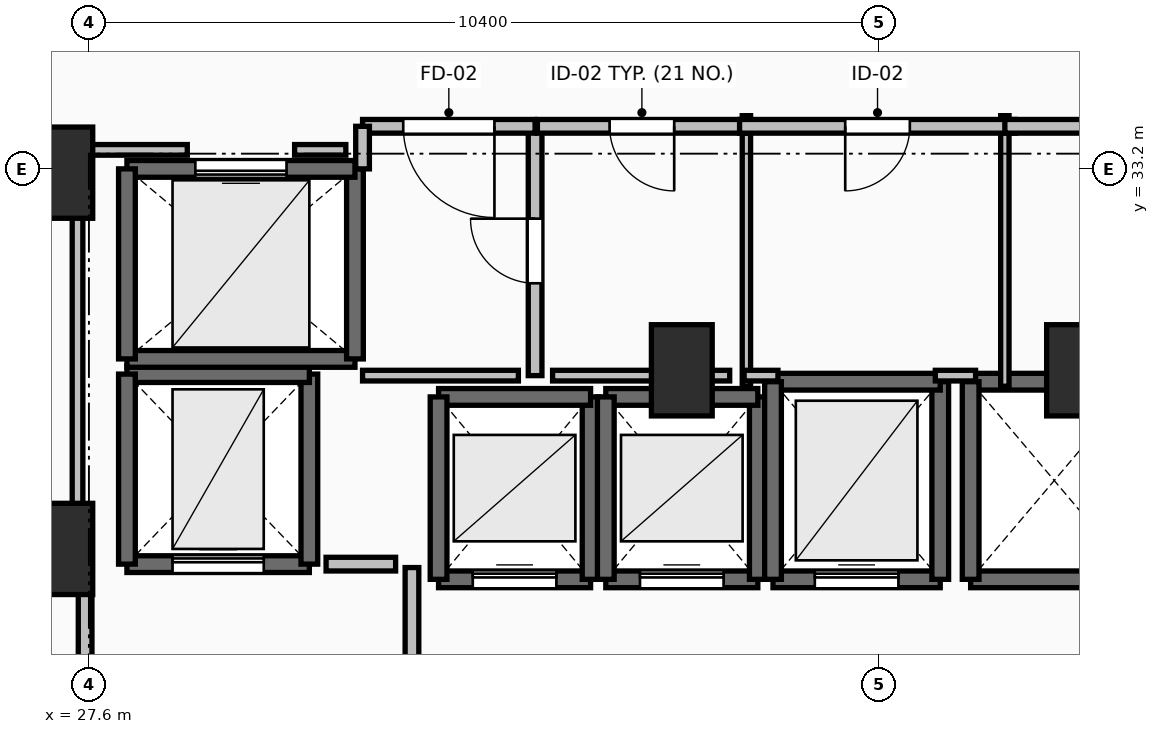
"""IFC4 building model, lengths in metres.
Left out: names, types, materials, properties, quantities, classifications, styles, units other than length and angle.
Written with IfcOpenShell. Run it as: python <this file> out.ifc"""

import sys

from ifc_helpers import new_model, si_unit, direction, frame, frame_2d, origin, origin_2d, place, context, subcontext, project, spatial, rectangle, extrude, element, fill, save


model = new_model("IFC4")
c1 = context("Model", 3, precision=1e-05, world=origin(), true_north=direction((0.0, 1.0)))
c2 = subcontext(c1, "Body", "Model", "MODEL_VIEW")
j1 = project(units=[si_unit("LENGTHUNIT", "METRE"), si_unit("PLANEANGLEUNIT", "RADIAN")], contexts=[c1])
p1 = place(None, origin())
s1 = spatial("IfcSite", under=j1, at=p1, CompositionType="ELEMENT")
p2 = place(p1, origin())
s2 = spatial("IfcBuilding", under=s1, at=p2, CompositionType="ELEMENT")
p3 = place(p2, frame((0.0, 0.0, 110.3)))
s3 = spatial("IfcBuildingStorey", under=s2, at=p3, CompositionType="ELEMENT", Elevation=110.3)
for number, where, z_axis, x_axis in (
    (1, (27.25, 28.2, 0.0), (0.0, 0.0, 1.0), (1.0, 0.0, 0.0)),
    (2, (27.25, 33.15, 0.0), (0.0, 0.0, 1.0), (1.0, 0.0, 0.0)),
    (3, (35.4, 30.55, 0.0), (0.0, 0.0, 1.0), (1.0, 0.0, 0.0)),
    (4, (40.6, 30.55, 0.0), (0.0, 0.0, 1.0), (1.0, 0.0, 0.0)),
):
    element("IfcColumn", number, at=place(p3, frame(where, z_axis=z_axis, x_axis=x_axis)), inside=s3, PredefinedType="PILASTER", context=c2, shape_type="SweptSolid", body=[
        extrude(rectangle(XDim=0.8, YDim=1.2, at=origin_2d()), origin(), (0.0, 0.0, 1.0), 3.5),
    ])
p4 = place(p3, frame((32.2, 27.8, 0.0), z_axis=(0.0, 0.0, 1.0), x_axis=(1.0, 0.0, 0.0)))
e5 = element("IfcWall", 5, at=p4, inside=s3, PredefinedType="SOLIDWALL", context=c2, shape_type="SweptSolid", body=[
    extrude(rectangle(XDim=2.0, YDim=0.22, at=frame_2d((1.0, 0.0))), origin(), (0.0, 0.0, 1.0), 3.24),
])
p5 = place(p4, frame((0.45, 0.0, 0.0)))
e6 = element("IfcOpeningElement", 6, at=p5, cuts=e5, PredefinedType="OPENING", context=c2, shape_type="SweptSolid", body=[
    extrude(rectangle(XDim=1.1, YDim=2.2, at=frame_2d((0.55, 1.1))), frame((0.0, 0.125, 0.0), z_axis=(0.0, -1.0, 0.0), x_axis=(1.0, 0.0, 0.0)), (0.0, 0.0, 1.0), 0.25),
])
p6 = place(p3, frame((34.2, 27.8, 0.0), z_axis=(0.0, 0.0, 1.0), x_axis=(0.0, 1.0, 0.0)))
e7 = element("IfcWall", 7, at=p6, inside=s3, PredefinedType="SOLIDWALL", context=c2, shape_type="SweptSolid", body=[
    extrude(rectangle(XDim=2.4, YDim=0.22, at=frame_2d((1.2, 0.0))), origin(), (0.0, 0.0, 1.0), 3.24),
])
p7 = place(p3, frame((34.2, 30.2, 0.0), z_axis=(0.0, 0.0, 1.0), x_axis=(-1.0, 0.0, 0.0)))
e8 = element("IfcWall", 8, at=p7, inside=s3, PredefinedType="SOLIDWALL", context=c2, shape_type="SweptSolid", body=[
    extrude(rectangle(XDim=2.0, YDim=0.22, at=frame_2d((1.0, 0.0))), origin(), (0.0, 0.0, 1.0), 3.24),
])
p8 = place(p3, frame((32.2, 30.2, 0.0), z_axis=(0.0, 0.0, 1.0), x_axis=(0.0, -1.0, 0.0)))
e9 = element("IfcWall", 9, at=p8, inside=s3, PredefinedType="SOLIDWALL", context=c2, shape_type="SweptSolid", body=[
    extrude(rectangle(XDim=2.4, YDim=0.22, at=frame_2d((1.2, 0.0))), origin(), (0.0, 0.0, 1.0), 3.24),
])
p9 = place(p3, frame((34.4, 27.8, 0.0), z_axis=(0.0, 0.0, 1.0), x_axis=(1.0, 0.0, 0.0)))
e10 = element("IfcWall", 10, at=p9, inside=s3, PredefinedType="SOLIDWALL", context=c2, shape_type="SweptSolid", body=[
    extrude(rectangle(XDim=2.0, YDim=0.22, at=frame_2d((1.0, 0.0))), origin(), (0.0, 0.0, 1.0), 3.24),
])
p10 = place(p9, frame((0.45, 0.0, 0.0)))
e11 = element("IfcOpeningElement", 11, at=p10, cuts=e10, PredefinedType="OPENING", context=c2, shape_type="SweptSolid", body=[
    extrude(rectangle(XDim=1.1, YDim=2.2, at=frame_2d((0.55, 1.1))), frame((0.0, 0.125, 0.0), z_axis=(0.0, -1.0, 0.0), x_axis=(1.0, 0.0, 0.0)), (0.0, 0.0, 1.0), 0.25),
])
p11 = place(p3, frame((36.4, 27.8, 0.0), z_axis=(0.0, 0.0, 1.0), x_axis=(0.0, 1.0, 0.0)))
e12 = element("IfcWall", 12, at=p11, inside=s3, PredefinedType="SOLIDWALL", context=c2, shape_type="SweptSolid", body=[
    extrude(rectangle(XDim=2.4, YDim=0.22, at=frame_2d((1.2, 0.0))), origin(), (0.0, 0.0, 1.0), 3.24),
])
p12 = place(p3, frame((36.4, 30.2, 0.0), z_axis=(0.0, 0.0, 1.0), x_axis=(-1.0, 0.0, 0.0)))
e13 = element("IfcWall", 13, at=p12, inside=s3, PredefinedType="SOLIDWALL", context=c2, shape_type="SweptSolid", body=[
    extrude(rectangle(XDim=2.0, YDim=0.22, at=frame_2d((1.0, 0.0))), origin(), (0.0, 0.0, 1.0), 3.24),
])
p13 = place(p3, frame((34.4, 30.2, 0.0), z_axis=(0.0, 0.0, 1.0), x_axis=(0.0, -1.0, 0.0)))
e14 = element("IfcWall", 14, at=p13, inside=s3, PredefinedType="SOLIDWALL", context=c2, shape_type="SweptSolid", body=[
    extrude(rectangle(XDim=2.4, YDim=0.22, at=frame_2d((1.2, 0.0))), origin(), (0.0, 0.0, 1.0), 3.24),
])
p14 = place(p3, frame((36.6, 27.8, 0.0), z_axis=(0.0, 0.0, 1.0), x_axis=(1.0, 0.0, 0.0)))
e15 = element("IfcWall", 15, at=p14, inside=s3, PredefinedType="SOLIDWALL", context=c2, shape_type="SweptSolid", body=[
    extrude(rectangle(XDim=2.2, YDim=0.22, at=frame_2d((1.1, 0.0))), origin(), (0.0, 0.0, 1.0), 3.24),
])
p15 = place(p14, frame((0.55, 0.0, 0.0)))
e16 = element("IfcOpeningElement", 16, at=p15, cuts=e15, PredefinedType="OPENING", context=c2, shape_type="SweptSolid", body=[
    extrude(rectangle(XDim=1.1, YDim=2.2, at=frame_2d((0.55, 1.1))), frame((0.0, 0.125, 0.0), z_axis=(0.0, -1.0, 0.0), x_axis=(1.0, 0.0, 0.0)), (0.0, 0.0, 1.0), 0.25),
])
p16 = place(p3, frame((38.8, 27.8, 0.0), z_axis=(0.0, 0.0, 1.0), x_axis=(0.0, 1.0, 0.0)))
e17 = element("IfcWall", 17, at=p16, inside=s3, PredefinedType="SOLIDWALL", context=c2, shape_type="SweptSolid", body=[
    extrude(rectangle(XDim=2.6, YDim=0.22, at=frame_2d((1.3, 0.0))), origin(), (0.0, 0.0, 1.0), 3.24),
])
p17 = place(p3, frame((38.8, 30.4, 0.0), z_axis=(0.0, 0.0, 1.0), x_axis=(-1.0, 0.0, 0.0)))
e18 = element("IfcWall", 18, at=p17, inside=s3, PredefinedType="SOLIDWALL", context=c2, shape_type="SweptSolid", body=[
    extrude(rectangle(XDim=2.2, YDim=0.22, at=frame_2d((1.1, 0.0))), origin(), (0.0, 0.0, 1.0), 3.24),
])
p18 = place(p3, frame((36.6, 30.4, 0.0), z_axis=(0.0, 0.0, 1.0), x_axis=(0.0, -1.0, 0.0)))
e19 = element("IfcWall", 19, at=p18, inside=s3, PredefinedType="SOLIDWALL", context=c2, shape_type="SweptSolid", body=[
    extrude(rectangle(XDim=2.6, YDim=0.22, at=frame_2d((1.3, 0.0))), origin(), (0.0, 0.0, 1.0), 3.24),
])
for number, where, z_axis, x_axis in (
    (20, (39.2, 27.8, 0.0), (0.0, 0.0, 1.0), (1.0, 0.0, 0.0)),
    (21, (41.4, 30.4, 0.0), (0.0, 0.0, 1.0), (-1.0, 0.0, 0.0)),
):
    element("IfcWall", number, at=place(p3, frame(where, z_axis=z_axis, x_axis=x_axis)), inside=s3, PredefinedType="SOLIDWALL", context=c2, shape_type="SweptSolid", body=[
        extrude(rectangle(XDim=2.2, YDim=0.22, at=frame_2d((1.1, 0.0))), origin(), (0.0, 0.0, 1.0), 3.24),
    ])
p19 = place(p3, frame((39.2, 30.4, 0.0), z_axis=(0.0, 0.0, 1.0), x_axis=(0.0, -1.0, 0.0)))
e22 = element("IfcWall", 22, at=p19, inside=s3, PredefinedType="SOLIDWALL", context=c2, shape_type="SweptSolid", body=[
    extrude(rectangle(XDim=2.6, YDim=0.22, at=frame_2d((1.3, 0.0))), origin(), (0.0, 0.0, 1.0), 3.24),
])
p20 = place(p3, frame((28.1, 28.0, 0.0), z_axis=(0.0, 0.0, 1.0), x_axis=(1.0, 0.0, 0.0)))
e23 = element("IfcWall", 23, at=p20, inside=s3, PredefinedType="SHEAR", context=c2, shape_type="SweptSolid", body=[
    extrude(rectangle(XDim=2.4, YDim=0.22, at=frame_2d((1.2, 0.0))), origin(), (0.0, 0.0, 1.0), 3.24),
])
p21 = place(p20, frame((0.6, 0.0, 0.0)))
e24 = element("IfcOpeningElement", 24, at=p21, cuts=e23, PredefinedType="OPENING", context=c2, shape_type="SweptSolid", body=[
    extrude(rectangle(XDim=1.2, YDim=2.2, at=frame_2d((0.6, 1.1))), frame((0.0, 0.125, 0.0), z_axis=(0.0, -1.0, 0.0), x_axis=(1.0, 0.0, 0.0)), (0.0, 0.0, 1.0), 0.25),
])
p22 = place(p3, frame((30.5, 28.0, 0.0), z_axis=(0.0, 0.0, 1.0), x_axis=(0.0, 1.0, 0.0)))
e25 = element("IfcWall", 25, at=p22, inside=s3, PredefinedType="SHEAR", context=c2, shape_type="SweptSolid", body=[
    extrude(rectangle(XDim=2.5, YDim=0.22, at=frame_2d((1.25, 0.0))), origin(), (0.0, 0.0, 1.0), 3.24),
])
p23 = place(p3, frame((30.5, 30.5, 0.0), z_axis=(0.0, 0.0, 1.0), x_axis=(-1.0, 0.0, 0.0)))
e26 = element("IfcWall", 26, at=p23, inside=s3, PredefinedType="SHEAR", context=c2, shape_type="SweptSolid", body=[
    extrude(rectangle(XDim=2.4, YDim=0.22, at=frame_2d((1.2, 0.0))), origin(), (0.0, 0.0, 1.0), 3.24),
])
p24 = place(p3, frame((28.1, 30.5, 0.0), z_axis=(0.0, 0.0, 1.0), x_axis=(0.0, -1.0, 0.0)))
e27 = element("IfcWall", 27, at=p24, inside=s3, PredefinedType="SHEAR", context=c2, shape_type="SweptSolid", body=[
    extrude(rectangle(XDim=2.5, YDim=0.22, at=frame_2d((1.25, 0.0))), origin(), (0.0, 0.0, 1.0), 3.24),
])
p25 = place(p3, frame((28.1, 30.7, 0.0), z_axis=(0.0, 0.0, 1.0), x_axis=(1.0, 0.0, 0.0)))
e28 = element("IfcWall", 28, at=p25, inside=s3, PredefinedType="SOLIDWALL", context=c2, shape_type="SweptSolid", body=[
    extrude(rectangle(XDim=3.0, YDim=0.22, at=frame_2d((1.5, 0.0))), origin(), (0.0, 0.0, 1.0), 3.24),
])
p26 = place(p3, frame((31.1, 30.7, 0.0), z_axis=(0.0, 0.0, 1.0), x_axis=(0.0, 1.0, 0.0)))
e29 = element("IfcWall", 29, at=p26, inside=s3, PredefinedType="SOLIDWALL", context=c2, shape_type="SweptSolid", body=[
    extrude(rectangle(XDim=2.5, YDim=0.22, at=frame_2d((1.25, 0.0))), origin(), (0.0, 0.0, 1.0), 3.24),
])
p27 = place(p3, frame((31.1, 33.2, 0.0), z_axis=(0.0, 0.0, 1.0), x_axis=(-1.0, 0.0, 0.0)))
e30 = element("IfcWall", 30, at=p27, inside=s3, PredefinedType="SOLIDWALL", context=c2, shape_type="SweptSolid", body=[
    extrude(rectangle(XDim=3.0, YDim=0.22, at=frame_2d((1.5, 0.0))), origin(), (0.0, 0.0, 1.0), 3.24),
])
p28 = place(p27, frame((0.9, 0.0, 0.0)))
e31 = element("IfcOpeningElement", 31, at=p28, cuts=e30, PredefinedType="OPENING", context=c2, shape_type="SweptSolid", body=[
    extrude(rectangle(XDim=1.2, YDim=2.2, at=frame_2d((0.6, 1.1))), frame((0.0, 0.125, 0.0), z_axis=(0.0, -1.0, 0.0), x_axis=(1.0, 0.0, 0.0)), (0.0, 0.0, 1.0), 0.25),
])
p29 = place(p3, frame((28.1, 33.2, 0.0), z_axis=(0.0, 0.0, 1.0), x_axis=(0.0, -1.0, 0.0)))
e32 = element("IfcWall", 32, at=p29, inside=s3, PredefinedType="SOLIDWALL", context=c2, shape_type="SweptSolid", body=[
    extrude(rectangle(XDim=2.5, YDim=0.22, at=frame_2d((1.25, 0.0))), origin(), (0.0, 0.0, 1.0), 3.24),
])
p30 = place(p3, frame((31.85, 24.045, 0.0), z_axis=(0.0, 0.0, 1.0), x_axis=(0.0, 1.0, 0.0)))
e33 = element("IfcWall", 33, at=p30, inside=s3, PredefinedType="PARTITIONING", context=c2, shape_type="SweptSolid", body=[
    extrude(rectangle(XDim=3.91, YDim=0.18, at=frame_2d((1.955, 0.0))), origin(), (0.0, 0.0, 1.0), 3.24),
])
p31 = place(p30, frame((1.355, 0.0, 0.0)))
e34 = element("IfcOpeningElement", 34, at=p31, cuts=e33, PredefinedType="OPENING", context=c2, shape_type="SweptSolid", body=[
    extrude(rectangle(XDim=1.2, YDim=2.15, at=frame_2d((0.6, 1.075))), frame((0.0, 0.105, 0.0), z_axis=(0.0, -1.0, 0.0), x_axis=(1.0, 0.0, 0.0)), (0.0, 0.0, 1.0), 0.21),
])
p32 = place(p3, frame((27.55, 28.0, 0.0), z_axis=(0.0, 0.0, 1.0), x_axis=(0.0, -1.0, 0.0)))
e35 = element("IfcWall", 35, at=p32, inside=s3, PredefinedType="PARTITIONING", context=c2, shape_type="SweptSolid", body=[
    extrude(rectangle(XDim=4.05, YDim=0.18, at=frame_2d((2.025, 0.0))), origin(), (0.0, 0.0, 1.0), 3.24),
])
p33 = place(p32, frame((1.425, 0.0, 0.0)))
e36 = element("IfcOpeningElement", 36, at=p33, cuts=e35, PredefinedType="OPENING", context=c2, shape_type="SweptSolid", body=[
    extrude(rectangle(XDim=1.2, YDim=2.15, at=frame_2d((0.6, 1.075))), frame((0.0, 0.105, 0.0), z_axis=(0.0, -1.0, 0.0), x_axis=(1.0, 0.0, 0.0)), (0.0, 0.0, 1.0), 0.21),
])
p34 = place(p3, frame((33.47, 30.48, 0.0), z_axis=(0.0, 0.0, 1.0), x_axis=(0.0, 1.0, 0.0)))
e37 = element("IfcWall", 37, at=p34, inside=s3, PredefinedType="PARTITIONING", context=c2, shape_type="SweptSolid", body=[
    extrude(rectangle(XDim=3.28, YDim=0.18, at=frame_2d((1.64, 0.0))), origin(), (0.0, 0.0, 1.0), 3.24),
])
p35 = place(p34, frame((1.215, 0.0, 0.0)))
e38 = element("IfcOpeningElement", 38, at=p35, cuts=e37, PredefinedType="OPENING", context=c2, shape_type="SweptSolid", body=[
    extrude(rectangle(XDim=0.85, YDim=2.1, at=frame_2d((0.425, 1.05))), frame((0.0, 0.105, 0.0), z_axis=(0.0, -1.0, 0.0), x_axis=(1.0, 0.0, 0.0)), (0.0, 0.0, 1.0), 0.21),
])
p36 = place(p3, frame((33.47, 33.76, 0.0), z_axis=(0.0, 0.0, 1.0), x_axis=(-1.0, 0.0, 0.0)))
e39 = element("IfcWall", 39, at=p36, inside=s3, PredefinedType="PARTITIONING", context=c2, shape_type="SweptSolid", body=[
    extrude(rectangle(XDim=2.27, YDim=0.18, at=frame_2d((1.135, 0.0))), origin(), (0.0, 0.0, 1.0), 3.24),
])
p37 = place(p36, frame((0.535, 0.0, 0.0)))
e40 = element("IfcOpeningElement", 40, at=p37, cuts=e39, PredefinedType="OPENING", context=c2, shape_type="SweptSolid", body=[
    extrude(rectangle(XDim=1.2, YDim=2.15, at=frame_2d((0.6, 1.075))), frame((0.0, 0.105, 0.0), z_axis=(0.0, -1.0, 0.0), x_axis=(1.0, 0.0, 0.0)), (0.0, 0.0, 1.0), 0.21),
])
p38 = place(p3, frame((31.2, 33.76, 0.0), z_axis=(0.0, 0.0, 1.0), x_axis=(0.0, -1.0, 0.0)))
e41 = element("IfcWall", 41, at=p38, inside=s3, PredefinedType="PARTITIONING", context=c2, shape_type="SweptSolid", body=[
    extrude(rectangle(XDim=0.56, YDim=0.18, at=frame_2d((0.28, 0.0))), origin(), (0.0, 0.0, 1.0), 3.24),
])
p39 = place(p3, frame((36.25, 30.34, 0.0), z_axis=(0.0, 0.0, 1.0), x_axis=(0.0, 1.0, 0.0)))
e42 = element("IfcWall", 42, at=p39, inside=s3, PredefinedType="PARTITIONING", context=c2, shape_type="SweptSolid", body=[
    extrude(rectangle(XDim=3.56, YDim=0.11, at=frame_2d((1.78, 0.0))), origin(), (0.0, 0.0, 1.0), 2.432),
])
p40 = place(p3, frame((36.25, 33.76, 0.0), z_axis=(0.0, 0.0, 1.0), x_axis=(-1.0, 0.0, 0.0)))
e43 = element("IfcWall", 43, at=p40, inside=s3, PredefinedType="PARTITIONING", context=c2, shape_type="SweptSolid", body=[
    extrude(rectangle(XDim=2.75, YDim=0.18, at=frame_2d((1.375, 0.0))), origin(), (0.0, 0.0, 1.0), 3.24),
])
p41 = place(p40, frame((0.95, 0.0, 0.0)))
e44 = element("IfcOpeningElement", 44, at=p41, cuts=e43, PredefinedType="OPENING", context=c2, shape_type="SweptSolid", body=[
    extrude(rectangle(XDim=0.85, YDim=2.1, at=frame_2d((0.425, 1.05))), frame((0.0, 0.105, 0.0), z_axis=(0.0, -1.0, 0.0), x_axis=(1.0, 0.0, 0.0)), (0.0, 0.0, 1.0), 0.21),
])
p42 = place(p3, frame((39.65, 30.34, 0.0), z_axis=(0.0, 0.0, 1.0), x_axis=(0.0, 1.0, 0.0)))
e45 = element("IfcWall", 45, at=p42, inside=s3, PredefinedType="PARTITIONING", context=c2, shape_type="SweptSolid", body=[
    extrude(rectangle(XDim=3.56, YDim=0.11, at=frame_2d((1.78, 0.0))), origin(), (0.0, 0.0, 1.0), 2.432),
])
p43 = place(p3, frame((39.79, 33.76, 0.0), z_axis=(0.0, 0.0, 1.0), x_axis=(-1.0, 0.0, 0.0)))
e46 = element("IfcWall", 46, at=p43, inside=s3, PredefinedType="PARTITIONING", context=c2, shape_type="SweptSolid", body=[
    extrude(rectangle(XDim=3.63, YDim=0.18, at=frame_2d((1.815, 0.0))), origin(), (0.0, 0.0, 1.0), 3.24),
])
p44 = place(p43, frame((1.39, 0.0, 0.0)))
e47 = element("IfcOpeningElement", 47, at=p44, cuts=e46, PredefinedType="OPENING", context=c2, shape_type="SweptSolid", body=[
    extrude(rectangle(XDim=0.85, YDim=2.1, at=frame_2d((0.425, 1.05))), frame((0.0, 0.105, 0.0), z_axis=(0.0, -1.0, 0.0), x_axis=(1.0, 0.0, 0.0)), (0.0, 0.0, 1.0), 0.21),
])
p45 = place(p3, frame((44.26, 33.76, 0.0), z_axis=(0.0, 0.0, 1.0), x_axis=(-1.0, 0.0, 0.0)))
e48 = element("IfcWall", 48, at=p45, inside=s3, PredefinedType="PARTITIONING", context=c2, shape_type="SweptSolid", body=[
    extrude(rectangle(XDim=4.61, YDim=0.18, at=frame_2d((2.305, 0.0))), origin(), (0.0, 0.0, 1.0), 3.24),
])
p46 = place(p45, frame((1.88, 0.0, 0.0)))
e49 = element("IfcOpeningElement", 49, at=p46, cuts=e48, PredefinedType="OPENING", context=c2, shape_type="SweptSolid", body=[
    extrude(rectangle(XDim=0.85, YDim=2.1, at=frame_2d((0.425, 1.05))), frame((0.0, 0.105, 0.0), z_axis=(0.0, -1.0, 0.0), x_axis=(1.0, 0.0, 0.0)), (0.0, 0.0, 1.0), 0.21),
])
p47 = place(p3, frame((31.635, 28.0, 0.0), z_axis=(0.0, 0.0, 1.0), x_axis=(-1.0, 0.0, 0.0)))
e50 = element("IfcWall", 50, at=p47, inside=s3, PredefinedType="PARTITIONING", context=c2, shape_type="SweptSolid", body=[
    extrude(rectangle(XDim=0.915, YDim=0.18, at=frame_2d((0.458, 0.0))), origin(), (0.0, 0.0, 1.0), 3.24),
])
p48 = place(p3, frame((31.2, 30.48, 0.0), z_axis=(0.0, 0.0, 1.0), x_axis=(1.0, 0.0, 0.0)))
e51 = element("IfcWall", 51, at=p48, inside=s3, PredefinedType="PARTITIONING", context=c2, shape_type="SweptSolid", body=[
    extrude(rectangle(XDim=2.05, YDim=0.14, at=frame_2d((1.025, 0.0))), origin(), (0.0, 0.0, 1.0), 3.24),
])
p49 = place(p3, frame((33.7, 30.48, 0.0), z_axis=(0.0, 0.0, 1.0), x_axis=(1.0, 0.0, 0.0)))
e52 = element("IfcWall", 52, at=p49, inside=s3, PredefinedType="PARTITIONING", context=c2, shape_type="SweptSolid", body=[
    extrude(rectangle(XDim=2.33, YDim=0.14, at=frame_2d((1.165, 0.0))), origin(), (0.0, 0.0, 1.0), 2.432),
])
p50 = place(p3, frame((36.22, 30.48, 0.0), z_axis=(0.0, 0.0, 1.0), x_axis=(1.0, 0.0, 0.0)))
e53 = element("IfcWall", 53, at=p50, inside=s3, PredefinedType="PARTITIONING", context=c2, shape_type="SweptSolid", body=[
    extrude(rectangle(XDim=0.445, YDim=0.14, at=frame_2d((0.223, 0.0))), origin(), (0.0, 0.0, 1.0), 2.432),
])
p51 = place(p3, frame((38.735, 30.48, 0.0), z_axis=(0.0, 0.0, 1.0), x_axis=(1.0, 0.0, 0.0)))
e54 = element("IfcWall", 54, at=p51, inside=s3, PredefinedType="PARTITIONING", context=c2, shape_type="SweptSolid", body=[
    extrude(rectangle(XDim=0.53, YDim=0.14, at=frame_2d((0.265, 0.0))), origin(), (0.0, 0.0, 1.0), 2.432),
])
p52 = place(p3, frame((27.45, 28.196, 0.0), z_axis=(0.0, 0.0, 1.0), x_axis=(0.0, 1.0, 0.0)))
e55 = element("IfcWall", 55, at=p52, inside=s3, PredefinedType="PARTITIONING", context=c2, shape_type="SweptSolid", body=[
    extrude(rectangle(XDim=5.254, YDim=0.14, at=frame_2d((2.627, 0.0))), origin(), (0.0, 0.0, 1.0), 2.432),
])
p53 = place(p3, frame((27.45, 33.45, 0.0), z_axis=(0.0, 0.0, 1.0), x_axis=(1.0, 0.0, 0.0)))
e56 = element("IfcWall", 56, at=p53, inside=s3, PredefinedType="PARTITIONING", context=c2, shape_type="SweptSolid", body=[
    extrude(rectangle(XDim=1.444, YDim=0.14, at=frame_2d((0.722, 0.0))), origin(), (0.0, 0.0, 1.0), 2.432),
])
p54 = place(p3, frame((30.306, 33.45, 0.0), z_axis=(0.0, 0.0, 1.0), x_axis=(1.0, 0.0, 0.0)))
e57 = element("IfcWall", 57, at=p54, inside=s3, PredefinedType="PARTITIONING", context=c2, shape_type="SweptSolid", body=[
    extrude(rectangle(XDim=0.674, YDim=0.14, at=frame_2d((0.337, 0.0))), origin(), (0.0, 0.0, 1.0), 3.24),
])
p55 = place(p5, origin())
e58 = element("IfcDoor", 58, at=p55, inside=s3, OperationType="SLIDING_TO_LEFT", PredefinedType="DOOR", context=c2, shape_type="SweptSolid", body=[
    extrude(rectangle(XDim=1.1, YDim=2.2, at=frame_2d((0.55, 1.1))), frame((0.0, 0.025, 0.0), z_axis=(0.0, -1.0, 0.0), x_axis=(1.0, 0.0, 0.0)), (0.0, 0.0, 1.0), 0.05),
])
fill(e6, e58)
p56 = place(p10, origin())
e59 = element("IfcDoor", 59, at=p56, inside=s3, OperationType="SLIDING_TO_LEFT", PredefinedType="DOOR", context=c2, shape_type="SweptSolid", body=[
    extrude(rectangle(XDim=1.1, YDim=2.2, at=frame_2d((0.55, 1.1))), frame((0.0, 0.025, 0.0), z_axis=(0.0, -1.0, 0.0), x_axis=(1.0, 0.0, 0.0)), (0.0, 0.0, 1.0), 0.05),
])
fill(e11, e59)
p57 = place(p15, origin())
e60 = element("IfcDoor", 60, at=p57, inside=s3, OperationType="SLIDING_TO_LEFT", PredefinedType="DOOR", context=c2, shape_type="SweptSolid", body=[
    extrude(rectangle(XDim=1.1, YDim=2.2, at=frame_2d((0.55, 1.1))), frame((0.0, 0.025, 0.0), z_axis=(0.0, -1.0, 0.0), x_axis=(1.0, 0.0, 0.0)), (0.0, 0.0, 1.0), 0.05),
])
fill(e16, e60)
p58 = place(p21, origin())
e61 = element("IfcDoor", 61, at=p58, inside=s3, OperationType="SLIDING_TO_LEFT", PredefinedType="DOOR", context=c2, shape_type="SweptSolid", body=[
    extrude(rectangle(XDim=1.2, YDim=2.2, at=frame_2d((0.6, 1.1))), frame((0.0, 0.025, 0.0), z_axis=(0.0, -1.0, 0.0), x_axis=(1.0, 0.0, 0.0)), (0.0, 0.0, 1.0), 0.05),
])
fill(e24, e61)
p59 = place(p28, origin())
e62 = element("IfcDoor", 62, at=p59, inside=s3, OperationType="SLIDING_TO_LEFT", PredefinedType="DOOR", context=c2, shape_type="SweptSolid", body=[
    extrude(rectangle(XDim=1.2, YDim=2.2, at=frame_2d((0.6, 1.1))), frame((0.0, 0.025, 0.0), z_axis=(0.0, -1.0, 0.0), x_axis=(1.0, 0.0, 0.0)), (0.0, 0.0, 1.0), 0.05),
])
fill(e31, e62)
p60 = place(p35, origin())
e63 = element("IfcDoor", 63, at=p60, inside=s3, OperationType="SINGLE_SWING_RIGHT", PredefinedType="DOOR", context=c2, shape_type="SweptSolid", body=[
    extrude(rectangle(XDim=0.85, YDim=2.1, at=frame_2d((0.425, 1.05))), frame((0.0, 0.025, 0.0), z_axis=(0.0, -1.0, 0.0), x_axis=(1.0, 0.0, 0.0)), (0.0, 0.0, 1.0), 0.05),
])
fill(e38, e63)
p61 = place(p37, origin())
e64 = element("IfcDoor", 64, at=p61, inside=s3, OperationType="SINGLE_SWING_LEFT", PredefinedType="DOOR", context=c2, shape_type="SweptSolid", body=[
    extrude(rectangle(XDim=1.2, YDim=2.15, at=frame_2d((0.6, 1.075))), frame((0.0, 0.025, 0.0), z_axis=(0.0, -1.0, 0.0), x_axis=(1.0, 0.0, 0.0)), (0.0, 0.0, 1.0), 0.05),
])
fill(e40, e64)
p62 = place(p41, origin())
e65 = element("IfcDoor", 65, at=p62, inside=s3, OperationType="SINGLE_SWING_LEFT", PredefinedType="DOOR", context=c2, shape_type="SweptSolid", body=[
    extrude(rectangle(XDim=0.85, YDim=2.1, at=frame_2d((0.425, 1.05))), frame((0.0, 0.025, 0.0), z_axis=(0.0, -1.0, 0.0), x_axis=(1.0, 0.0, 0.0)), (0.0, 0.0, 1.0), 0.05),
])
fill(e44, e65)
p63 = place(p44, origin())
e66 = element("IfcDoor", 66, at=p63, inside=s3, OperationType="SINGLE_SWING_RIGHT", PredefinedType="DOOR", context=c2, shape_type="SweptSolid", body=[
    extrude(rectangle(XDim=0.85, YDim=2.1, at=frame_2d((0.425, 1.05))), frame((0.0, 0.025, 0.0), z_axis=(0.0, -1.0, 0.0), x_axis=(1.0, 0.0, 0.0)), (0.0, 0.0, 1.0), 0.05),
])
fill(e47, e66)
save(model, sys.argv[1])
